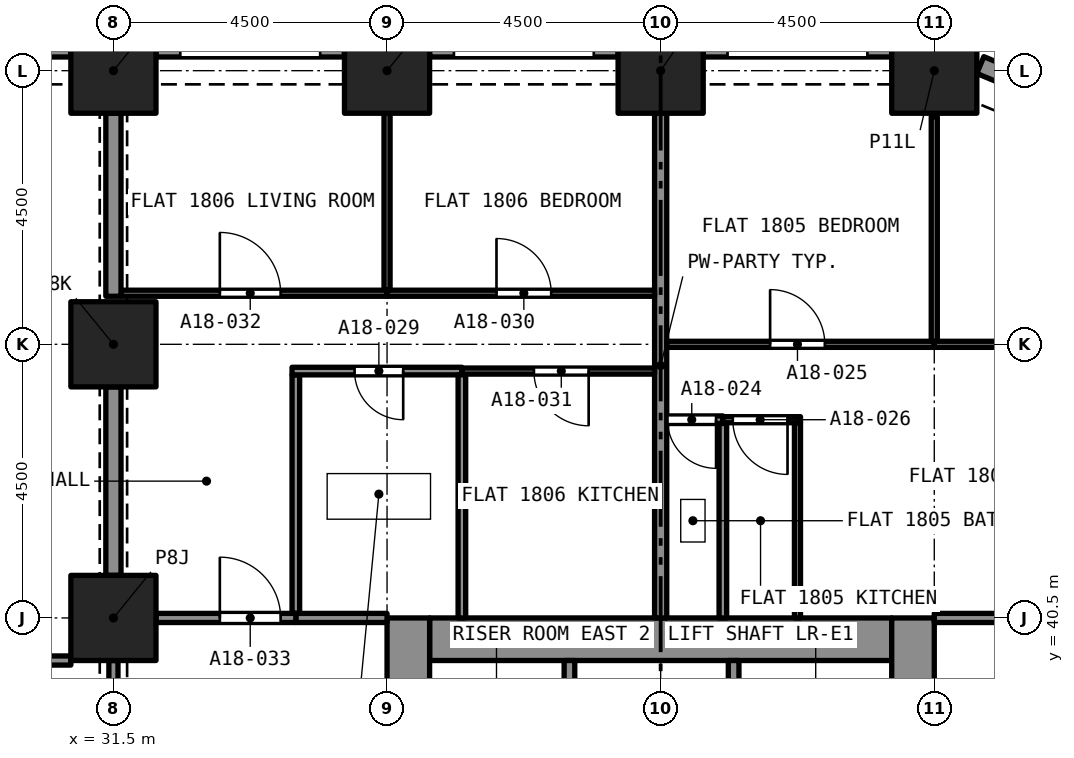
"""IFC4 building model, lengths in metres.
Left out: names, types, materials, properties, quantities, classifications, styles, units other than length and angle.
Written with IfcOpenShell. Run it as: python <this file> out.ifc"""

import sys

from ifc_helpers import new_model, si_unit, direction, frame, frame_2d, origin, origin_2d, place, context, subcontext, project, spatial, rectangle, extrude, element, fill, save


model = new_model("IFC4")
c1 = context("Model", 3, precision=1e-05, world=origin(), true_north=direction((0.0, 1.0)))
c2 = subcontext(c1, "Body", "Model", "MODEL_VIEW")
j1 = project(units=[si_unit("LENGTHUNIT", "METRE"), si_unit("PLANEANGLEUNIT", "RADIAN")], contexts=[c1])
p1 = place(None, origin())
s1 = spatial("IfcSite", under=j1, at=p1, CompositionType="ELEMENT")
p2 = place(p1, origin())
s2 = spatial("IfcBuilding", under=s1, at=p2, CompositionType="ELEMENT")
p3 = place(p2, frame((0.0, 0.0, 68.8)))
s3 = spatial("IfcBuildingStorey", under=s2, at=p3, CompositionType="ELEMENT", Elevation=68.8)
for number, where, z_axis, x_axis in (
    (1, (31.5, 40.5, 0.0), (0.0, 0.0, 1.0), (1.0, 0.0, 0.0)),
    (2, (31.5, 45.0, 0.0), (0.0, 0.0, 1.0), (1.0, 0.0, 0.0)),
    (3, (31.5, 49.5, 0.0), (0.0, 0.0, 1.0), (1.0, 0.0, 0.0)),
    (4, (36.0, 49.5, 0.0), (0.0, 0.0, 1.0), (1.0, 0.0, 0.0)),
    (5, (40.5, 49.5, 0.0), (0.0, 0.0, 1.0), (1.0, 0.0, 0.0)),
    (6, (45.0, 49.5, 0.0), (0.0, 0.0, 1.0), (1.0, 0.0, 0.0)),
):
    element("IfcColumn", number, at=place(p3, frame(where, z_axis=z_axis, x_axis=x_axis)), inside=s3, PredefinedType="COLUMN", context=c2, shape_type="SweptSolid", body=[
        extrude(rectangle(XDim=1.4, YDim=1.4, at=origin_2d()), origin(), (0.0, 0.0, 1.0), 3.2),
    ])
p4 = place(p3, frame((36.7, 40.15, 0.0), z_axis=(0.0, 0.0, 1.0), x_axis=(1.0, 0.0, 0.0)))
e7 = element("IfcWall", 7, at=p4, inside=s3, PredefinedType="SOLIDWALL", context=c2, shape_type="SweptSolid", body=[
    extrude(rectangle(XDim=7.6, YDim=0.7, at=frame_2d((3.8, 0.0))), origin(), (0.0, 0.0, 1.0), 3.2),
])
p5 = place(p3, frame((36.35, 27.0, 0.0), z_axis=(0.0, 0.0, 1.0), x_axis=(0.0, 1.0, 0.0)))
e8 = element("IfcWall", 8, at=p5, inside=s3, PredefinedType="SOLIDWALL", context=c2, shape_type="SweptSolid", body=[
    extrude(rectangle(XDim=13.5, YDim=0.7, at=frame_2d((6.75, 0.0))), origin(), (0.0, 0.0, 1.0), 3.2),
])
p6 = place(p5, frame((8.95, 0.0, 0.0)))
e9 = element("IfcOpeningElement", 9, at=p6, cuts=e8, PredefinedType="OPENING", context=c2, shape_type="SweptSolid", body=[
    extrude(rectangle(XDim=1.2, YDim=2.1, at=frame_2d((0.6, 1.05))), frame((0.0, 0.36, 0.0), z_axis=(0.0, -1.0, 0.0), x_axis=(1.0, 0.0, 0.0)), (0.0, 0.0, 1.0), 0.72),
])
p7 = place(p3, frame((44.65, 27.0, 0.0), z_axis=(0.0, 0.0, 1.0), x_axis=(0.0, 1.0, 0.0)))
e10 = element("IfcWall", 10, at=p7, inside=s3, PredefinedType="SOLIDWALL", context=c2, shape_type="SweptSolid", body=[
    extrude(rectangle(XDim=13.5, YDim=0.7, at=frame_2d((6.75, 0.0))), origin(), (0.0, 0.0, 1.0), 3.2),
])
p8 = place(p7, frame((8.95, 0.0, 0.0)))
e11 = element("IfcOpeningElement", 11, at=p8, cuts=e10, PredefinedType="OPENING", context=c2, shape_type="SweptSolid", body=[
    extrude(rectangle(XDim=1.2, YDim=2.1, at=frame_2d((0.6, 1.05))), frame((0.0, 0.36, 0.0), z_axis=(0.0, -1.0, 0.0), x_axis=(1.0, 0.0, 0.0)), (0.0, 0.0, 1.0), 0.72),
])
p9 = place(p3, frame((45.757, 49.592, 0.0), z_axis=(0.0, 0.0, 1.0), x_axis=(0.923857286003, -0.382737135771, 0.0)))
e12 = element("IfcWall", 12, at=p9, inside=s3, PredefinedType="SOLIDWALL", context=c2, shape_type="SweptSolid", body=[
    extrude(rectangle(XDim=1.865, YDim=0.3, at=frame_2d((0.933, 0.0))), origin(), (0.0, 0.0, 1.0), 3.2),
])
p10 = place(p9, frame((0.508, 0.0, 0.45)))
e13 = element("IfcOpeningElement", 13, at=p10, cuts=e12, PredefinedType="OPENING", context=c2, shape_type="SweptSolid", body=[
    extrude(rectangle(XDim=1.1, YDim=1.95, at=frame_2d((0.55, 0.975))), frame((0.0, 0.16, 0.0), z_axis=(0.0, -1.0, 0.0), x_axis=(1.0, 0.0, 0.0)), (0.0, 0.0, 1.0), 0.32),
])
p11 = place(p3, frame((41.2, 49.875, 0.0), z_axis=(0.0, 0.0, 1.0), x_axis=(1.0, 0.0, 0.0)))
e14 = element("IfcWall", 14, at=p11, inside=s3, PredefinedType="SOLIDWALL", context=c2, shape_type="SweptSolid", body=[
    extrude(rectangle(XDim=3.1, YDim=0.3, at=frame_2d((1.55, 0.0))), origin(), (0.0, 0.0, 1.0), 3.2),
])
p12 = place(p11, frame((0.4, 0.0, 0.45)))
e15 = element("IfcOpeningElement", 15, at=p12, cuts=e14, PredefinedType="OPENING", context=c2, shape_type="SweptSolid", body=[
    extrude(rectangle(XDim=2.3, YDim=1.95, at=frame_2d((1.15, 0.975))), frame((0.0, 0.16, 0.0), z_axis=(0.0, -1.0, 0.0), x_axis=(1.0, 0.0, 0.0)), (0.0, 0.0, 1.0), 0.32),
])
p13 = place(p3, frame((36.7, 49.875, 0.0), z_axis=(0.0, 0.0, 1.0), x_axis=(1.0, 0.0, 0.0)))
e16 = element("IfcWall", 16, at=p13, inside=s3, PredefinedType="SOLIDWALL", context=c2, shape_type="SweptSolid", body=[
    extrude(rectangle(XDim=3.1, YDim=0.3, at=frame_2d((1.55, 0.0))), origin(), (0.0, 0.0, 1.0), 3.2),
])
p14 = place(p13, frame((0.4, 0.0, 0.45)))
e17 = element("IfcOpeningElement", 17, at=p14, cuts=e16, PredefinedType="OPENING", context=c2, shape_type="SweptSolid", body=[
    extrude(rectangle(XDim=2.3, YDim=1.95, at=frame_2d((1.15, 0.975))), frame((0.0, 0.16, 0.0), z_axis=(0.0, -1.0, 0.0), x_axis=(1.0, 0.0, 0.0)), (0.0, 0.0, 1.0), 0.32),
])
p15 = place(p3, frame((32.2, 49.875, 0.0), z_axis=(0.0, 0.0, 1.0), x_axis=(1.0, 0.0, 0.0)))
e18 = element("IfcWall", 18, at=p15, inside=s3, PredefinedType="SOLIDWALL", context=c2, shape_type="SweptSolid", body=[
    extrude(rectangle(XDim=3.1, YDim=0.3, at=frame_2d((1.55, 0.0))), origin(), (0.0, 0.0, 1.0), 3.2),
])
p16 = place(p15, frame((0.4, 0.0, 0.45)))
e19 = element("IfcOpeningElement", 19, at=p16, cuts=e18, PredefinedType="OPENING", context=c2, shape_type="SweptSolid", body=[
    extrude(rectangle(XDim=2.3, YDim=1.95, at=frame_2d((1.15, 0.975))), frame((0.0, 0.16, 0.0), z_axis=(0.0, -1.0, 0.0), x_axis=(1.0, 0.0, 0.0)), (0.0, 0.0, 1.0), 0.32),
])
p17 = place(p3, frame((27.7, 49.875, 0.0), z_axis=(0.0, 0.0, 1.0), x_axis=(1.0, 0.0, 0.0)))
e20 = element("IfcWall", 20, at=p17, inside=s3, PredefinedType="SOLIDWALL", context=c2, shape_type="SweptSolid", body=[
    extrude(rectangle(XDim=3.1, YDim=0.3, at=frame_2d((1.55, 0.0))), origin(), (0.0, 0.0, 1.0), 3.2),
])
p18 = place(p17, frame((0.4, 0.0, 0.45)))
e21 = element("IfcOpeningElement", 21, at=p18, cuts=e20, PredefinedType="OPENING", context=c2, shape_type="SweptSolid", body=[
    extrude(rectangle(XDim=2.3, YDim=1.95, at=frame_2d((1.15, 0.975))), frame((0.0, 0.16, 0.0), z_axis=(0.0, -1.0, 0.0), x_axis=(1.0, 0.0, 0.0)), (0.0, 0.0, 1.0), 0.32),
])
p19 = place(p3, frame((41.523, 43.76, 0.0), z_axis=(0.0, 0.0, 1.0), x_axis=(-1.0, 0.0, 0.0)))
e22 = element("IfcWall", 22, at=p19, inside=s3, PredefinedType="PARTITIONING", context=c2, shape_type="SweptSolid", body=[
    extrude(rectangle(XDim=0.923, YDim=0.125, at=frame_2d((0.461, 0.0))), origin(), (0.0, 0.0, 1.0), 2.9),
])
p20 = place(p19, frame((0.111, 0.0, 0.0)))
e23 = element("IfcOpeningElement", 23, at=p20, cuts=e22, PredefinedType="OPENING", context=c2, shape_type="SweptSolid", body=[
    extrude(rectangle(XDim=0.8, YDim=2.1, at=frame_2d((0.4, 1.05))), frame((0.0, 0.073, 0.0), z_axis=(0.0, -1.0, 0.0), x_axis=(1.0, 0.0, 0.0)), (0.0, 0.0, 1.0), 0.145),
])
p21 = place(p3, frame((41.523, 40.5, 0.0), z_axis=(0.0, 0.0, 1.0), x_axis=(0.0, 1.0, 0.0)))
e24 = element("IfcWall", 24, at=p21, inside=s3, PredefinedType="PARTITIONING", context=c2, shape_type="SweptSolid", body=[
    extrude(rectangle(XDim=3.198, YDim=0.125, at=frame_2d((1.599, 0.0))), origin(), (0.0, 0.0, 1.0), 2.9),
])
p22 = place(p3, frame((40.5, 40.5, 0.0), z_axis=(0.0, 0.0, 1.0), x_axis=(0.0, 1.0, 0.0)))
e25 = element("IfcWall", 25, at=p22, inside=s3, PredefinedType="PARTITIONING", context=c2, shape_type="SweptSolid", body=[
    extrude(rectangle(XDim=8.3, YDim=0.2, at=frame_2d((4.15, 0.0))), origin(), (0.0, 0.0, 1.0), 2.9),
])
p23 = place(p3, frame((40.6, 45.0, 0.0), z_axis=(0.0, 0.0, 1.0), x_axis=(1.0, 0.0, 0.0)))
e26 = element("IfcWall", 26, at=p23, inside=s3, PredefinedType="PARTITIONING", context=c2, shape_type="SweptSolid", body=[
    extrude(rectangle(XDim=4.4, YDim=0.1, at=frame_2d((2.2, 0.0))), origin(), (0.0, 0.0, 1.0), 2.9),
])
p24 = place(p23, frame((1.7, 0.0, 0.0)))
e27 = element("IfcOpeningElement", 27, at=p24, cuts=e26, PredefinedType="OPENING", context=c2, shape_type="SweptSolid", body=[
    extrude(rectangle(XDim=0.9, YDim=2.1, at=frame_2d((0.45, 1.05))), frame((0.0, 0.06, 0.0), z_axis=(0.0, -1.0, 0.0), x_axis=(1.0, 0.0, 0.0)), (0.0, 0.0, 1.0), 0.12),
])
p25 = place(p3, frame((45.0, 45.05, 0.0), z_axis=(0.0, 0.0, 1.0), x_axis=(0.0, 1.0, 0.0)))
e28 = element("IfcWall", 28, at=p25, inside=s3, PredefinedType="PARTITIONING", context=c2, shape_type="SweptSolid", body=[
    extrude(rectangle(XDim=3.692, YDim=0.1, at=frame_2d((1.846, 0.0))), origin(), (0.0, 0.0, 1.0), 2.9),
])
p26 = place(p3, frame((42.75, 40.5, 0.0), z_axis=(0.0, 0.0, 1.0), x_axis=(0.0, 1.0, 0.0)))
e29 = element("IfcWall", 29, at=p26, inside=s3, PredefinedType="PARTITIONING", context=c2, shape_type="SweptSolid", body=[
    extrude(rectangle(XDim=3.21, YDim=0.1, at=frame_2d((1.605, 0.0))), origin(), (0.0, 0.0, 1.0), 2.9),
])
p27 = place(p3, frame((42.8, 43.76, 0.0), z_axis=(0.0, 0.0, 1.0), x_axis=(-1.0, 0.0, 0.0)))
e30 = element("IfcWall", 30, at=p27, inside=s3, PredefinedType="PARTITIONING", context=c2, shape_type="SweptSolid", body=[
    extrude(rectangle(XDim=1.277, YDim=0.1, at=frame_2d((0.639, 0.0))), origin(), (0.0, 0.0, 1.0), 2.9),
])
p28 = place(p27, frame((0.214, 0.0, 0.0)))
e31 = element("IfcOpeningElement", 31, at=p28, cuts=e30, PredefinedType="OPENING", context=c2, shape_type="SweptSolid", body=[
    extrude(rectangle(XDim=0.9, YDim=2.1, at=frame_2d((0.45, 1.05))), frame((0.0, 0.06, 0.0), z_axis=(0.0, -1.0, 0.0), x_axis=(1.0, 0.0, 0.0)), (0.0, 0.0, 1.0), 0.12),
])
p29 = place(p3, frame((45.0, 45.0, 0.0), z_axis=(0.0, 0.0, 1.0), x_axis=(1.0, 0.0, 0.0)))
e32 = element("IfcWall", 32, at=p29, inside=s3, PredefinedType="PARTITIONING", context=c2, shape_type="SweptSolid", body=[
    extrude(rectangle(XDim=3.742, YDim=0.1, at=frame_2d((1.871, 0.0))), origin(), (0.0, 0.0, 1.0), 2.9),
])
p30 = place(p29, frame((1.4, 0.0, 0.0)))
e33 = element("IfcOpeningElement", 33, at=p30, cuts=e32, PredefinedType="OPENING", context=c2, shape_type="SweptSolid", body=[
    extrude(rectangle(XDim=1.0, YDim=2.1, at=frame_2d((0.5, 1.05))), frame((0.0, 0.06, 0.0), z_axis=(0.0, -1.0, 0.0), x_axis=(1.0, 0.0, 0.0)), (0.0, 0.0, 1.0), 0.12),
])
p31 = place(p3, frame((45.0, 40.5, 0.0), z_axis=(0.0, 0.0, 1.0), x_axis=(1.0, 0.0, 0.0)))
e34 = element("IfcWall", 34, at=p31, inside=s3, PredefinedType="PARTITIONING", context=c2, shape_type="SweptSolid", body=[
    extrude(rectangle(XDim=3.8, YDim=0.15, at=frame_2d((1.9, 0.0))), origin(), (0.0, 0.0, 1.0), 2.9),
])
p32 = place(p31, frame((1.75, 0.0, 0.0)))
e35 = element("IfcOpeningElement", 35, at=p32, cuts=e34, PredefinedType="OPENING", context=c2, shape_type="SweptSolid", body=[
    extrude(rectangle(XDim=1.0, YDim=2.1, at=frame_2d((0.5, 1.05))), frame((0.0, 0.085, 0.0), z_axis=(0.0, -1.0, 0.0), x_axis=(1.0, 0.0, 0.0)), (0.0, 0.0, 1.0), 0.17),
])
p33 = place(p3, frame((34.5, 40.575, 0.0), z_axis=(0.0, 0.0, 1.0), x_axis=(0.0, 1.0, 0.0)))
e36 = element("IfcWall", 36, at=p33, inside=s3, PredefinedType="PARTITIONING", context=c2, shape_type="SweptSolid", body=[
    extrude(rectangle(XDim=3.923, YDim=0.125, at=frame_2d((1.961, 0.0))), origin(), (0.0, 0.0, 1.0), 2.9),
])
p34 = place(p3, frame((37.231, 44.56, 0.0), z_axis=(0.0, 0.0, 1.0), x_axis=(-1.0, 0.0, 0.0)))
e37 = element("IfcWall", 37, at=p34, inside=s3, PredefinedType="PARTITIONING", context=c2, shape_type="SweptSolid", body=[
    extrude(rectangle(XDim=2.794, YDim=0.125, at=frame_2d((1.397, 0.0))), origin(), (0.0, 0.0, 1.0), 2.9),
])
p35 = place(p34, frame((0.966, 0.0, 0.0)))
e38 = element("IfcOpeningElement", 38, at=p35, cuts=e37, PredefinedType="OPENING", context=c2, shape_type="SweptSolid", body=[
    extrude(rectangle(XDim=0.8, YDim=2.1, at=frame_2d((0.4, 1.05))), frame((0.0, 0.073, 0.0), z_axis=(0.0, -1.0, 0.0), x_axis=(1.0, 0.0, 0.0)), (0.0, 0.0, 1.0), 0.145),
])
p36 = place(p3, frame((37.231, 40.5, 0.0), z_axis=(0.0, 0.0, 1.0), x_axis=(0.0, 1.0, 0.0)))
e39 = element("IfcWall", 39, at=p36, inside=s3, PredefinedType="PARTITIONING", context=c2, shape_type="SweptSolid", body=[
    extrude(rectangle(XDim=3.998, YDim=0.125, at=frame_2d((1.999, 0.0))), origin(), (0.0, 0.0, 1.0), 2.9),
])
p37 = place(p3, frame((34.5, 40.5, 0.0), z_axis=(0.0, 0.0, 1.0), x_axis=(1.0, 0.0, 0.0)))
e40 = element("IfcWall", 40, at=p37, inside=s3, PredefinedType="PARTITIONING", context=c2, shape_type="SweptSolid", body=[
    extrude(rectangle(XDim=1.5, YDim=0.15, at=frame_2d((0.75, 0.0))), origin(), (0.0, 0.0, 1.0), 2.9),
])
p38 = place(p3, frame((36.0, 45.84, 0.0), z_axis=(0.0, 0.0, 1.0), x_axis=(1.0, 0.0, 0.0)))
e41 = element("IfcWall", 41, at=p38, inside=s3, PredefinedType="PARTITIONING", context=c2, shape_type="SweptSolid", body=[
    extrude(rectangle(XDim=4.4, YDim=0.1, at=frame_2d((2.2, 0.0))), origin(), (0.0, 0.0, 1.0), 2.9),
])
p39 = place(p38, frame((1.8, 0.0, 0.0)))
e42 = element("IfcOpeningElement", 42, at=p39, cuts=e41, PredefinedType="OPENING", context=c2, shape_type="SweptSolid", body=[
    extrude(rectangle(XDim=0.9, YDim=2.1, at=frame_2d((0.45, 1.05))), frame((0.0, 0.06, 0.0), z_axis=(0.0, -1.0, 0.0), x_axis=(1.0, 0.0, 0.0)), (0.0, 0.0, 1.0), 0.12),
])
p40 = place(p3, frame((36.0, 45.89, 0.0), z_axis=(0.0, 0.0, 1.0), x_axis=(0.0, 1.0, 0.0)))
e43 = element("IfcWall", 43, at=p40, inside=s3, PredefinedType="PARTITIONING", context=c2, shape_type="SweptSolid", body=[
    extrude(rectangle(XDim=2.91, YDim=0.1, at=frame_2d((1.455, 0.0))), origin(), (0.0, 0.0, 1.0), 2.9),
])
p41 = place(p3, frame((40.4, 44.56, 0.0), z_axis=(0.0, 0.0, 1.0), x_axis=(-1.0, 0.0, 0.0)))
e44 = element("IfcWall", 44, at=p41, inside=s3, PredefinedType="PARTITIONING", context=c2, shape_type="SweptSolid", body=[
    extrude(rectangle(XDim=3.168, YDim=0.1, at=frame_2d((1.584, 0.0))), origin(), (0.0, 0.0, 1.0), 2.9),
])
p42 = place(p41, frame((1.084, 0.0, 0.0)))
e45 = element("IfcOpeningElement", 45, at=p42, cuts=e44, PredefinedType="OPENING", context=c2, shape_type="SweptSolid", body=[
    extrude(rectangle(XDim=0.9, YDim=2.1, at=frame_2d((0.45, 1.05))), frame((0.0, 0.06, 0.0), z_axis=(0.0, -1.0, 0.0), x_axis=(1.0, 0.0, 0.0)), (0.0, 0.0, 1.0), 0.12),
])
p43 = place(p3, frame((31.625, 45.84, 0.0), z_axis=(0.0, 0.0, 1.0), x_axis=(1.0, 0.0, 0.0)))
e46 = element("IfcWall", 46, at=p43, inside=s3, PredefinedType="PARTITIONING", context=c2, shape_type="SweptSolid", body=[
    extrude(rectangle(XDim=4.375, YDim=0.1, at=frame_2d((2.188, 0.0))), origin(), (0.0, 0.0, 1.0), 2.9),
])
p44 = place(p43, frame((1.625, 0.0, 0.0)))
e47 = element("IfcOpeningElement", 47, at=p44, cuts=e46, PredefinedType="OPENING", context=c2, shape_type="SweptSolid", body=[
    extrude(rectangle(XDim=1.0, YDim=2.1, at=frame_2d((0.5, 1.05))), frame((0.0, 0.06, 0.0), z_axis=(0.0, -1.0, 0.0), x_axis=(1.0, 0.0, 0.0)), (0.0, 0.0, 1.0), 0.12),
])
p45 = place(p3, frame((31.5, 41.2, 0.0), z_axis=(0.0, 0.0, 1.0), x_axis=(0.0, 1.0, 0.0)))
e48 = element("IfcWall", 48, at=p45, inside=s3, PredefinedType="PARTITIONING", context=c2, shape_type="SweptSolid", body=[
    extrude(rectangle(XDim=3.1, YDim=0.25, at=frame_2d((1.55, 0.0))), origin(), (0.0, 0.0, 1.0), 2.38),
])
p46 = place(p3, frame((32.2, 40.5, 0.0), z_axis=(0.0, 0.0, 1.0), x_axis=(1.0, 0.0, 0.0)))
e49 = element("IfcWall", 49, at=p46, inside=s3, PredefinedType="PARTITIONING", context=c2, shape_type="SweptSolid", body=[
    extrude(rectangle(XDim=2.3, YDim=0.15, at=frame_2d((1.15, 0.0))), origin(), (0.0, 0.0, 1.0), 2.9),
])
p47 = place(p46, frame((1.05, 0.0, 0.0)))
e50 = element("IfcOpeningElement", 50, at=p47, cuts=e49, PredefinedType="OPENING", context=c2, shape_type="SweptSolid", body=[
    extrude(rectangle(XDim=1.0, YDim=2.1, at=frame_2d((0.5, 1.05))), frame((0.0, 0.085, 0.0), z_axis=(0.0, -1.0, 0.0), x_axis=(1.0, 0.0, 0.0)), (0.0, 0.0, 1.0), 0.17),
])
p48 = place(p3, frame((31.5, 45.79, 0.0), z_axis=(0.0, 0.0, 1.0), x_axis=(0.0, 1.0, 0.0)))
e51 = element("IfcWall", 51, at=p48, inside=s3, PredefinedType="PARTITIONING", context=c2, shape_type="SweptSolid", body=[
    extrude(rectangle(XDim=3.01, YDim=0.25, at=frame_2d((1.505, 0.0))), origin(), (0.0, 0.0, 1.0), 2.38),
])
p49 = place(p3, frame((18.7, 39.8, 0.0), z_axis=(0.0, 0.0, 1.0), x_axis=(1.0, 0.0, 0.0)))
e52 = element("IfcWall", 52, at=p49, inside=s3, PredefinedType="PARTITIONING", context=c2, shape_type="SweptSolid", body=[
    extrude(rectangle(XDim=12.1, YDim=0.15, at=frame_2d((6.05, 0.0))), origin(), (0.0, 0.0, 1.0), 2.75),
])
p50 = place(p49, frame((5.55, 0.0, 0.0)))
e53 = element("IfcOpeningElement", 53, at=p50, cuts=e52, PredefinedType="OPENING", context=c2, shape_type="SweptSolid", body=[
    extrude(rectangle(XDim=1.0, YDim=2.1, at=frame_2d((0.5, 1.05))), frame((0.0, 0.085, 0.0), z_axis=(0.0, -1.0, 0.0), x_axis=(1.0, 0.0, 0.0)), (0.0, 0.0, 1.0), 0.17),
])
p51 = place(p3, frame((31.5, 36.7, 0.0), z_axis=(0.0, 0.0, 1.0), x_axis=(0.0, 1.0, 0.0)))
e54 = element("IfcWall", 54, at=p51, inside=s3, PredefinedType="PARTITIONING", context=c2, shape_type="SweptSolid", body=[
    extrude(rectangle(XDim=3.1, YDim=0.15, at=frame_2d((1.55, 0.0))), origin(), (0.0, 0.0, 1.0), 2.38),
])
p52 = place(p51, frame((0.95, 0.0, 0.0)))
e55 = element("IfcOpeningElement", 55, at=p52, cuts=e54, PredefinedType="OPENING", context=c2, shape_type="SweptSolid", body=[
    extrude(rectangle(XDim=1.2, YDim=2.1, at=frame_2d((0.6, 1.05))), frame((0.0, 0.085, 0.0), z_axis=(0.0, -1.0, 0.0), x_axis=(1.0, 0.0, 0.0)), (0.0, 0.0, 1.0), 0.17),
])
for number, where, z_axis, x_axis in (
    (56, (41.7, 37.5, 0.0), (0.0, 0.0, 1.0), (0.0, 1.0, 0.0)),
    (57, (39.0, 37.5, 0.0), (0.0, 0.0, 1.0), (0.0, 1.0, 0.0)),
):
    element("IfcWall", number, at=place(p3, frame(where, z_axis=z_axis, x_axis=x_axis)), inside=s3, PredefinedType="SOLIDWALL", context=c2, shape_type="SweptSolid", body=[
        extrude(rectangle(XDim=2.3, YDim=0.175, at=frame_2d((1.15, 0.0))), origin(), (0.0, 0.0, 1.0), 2.9),
    ])
p53 = place(p20, origin())
e58 = element("IfcDoor", 58, at=p53, inside=s3, OperationType="SINGLE_SWING_RIGHT", PredefinedType="DOOR", context=c2, shape_type="SweptSolid", body=[
    extrude(rectangle(XDim=0.8, YDim=2.1, at=frame_2d((0.4, 1.05))), frame((0.0, 0.025, 0.0), z_axis=(0.0, -1.0, 0.0), x_axis=(1.0, 0.0, 0.0)), (0.0, 0.0, 1.0), 0.05),
])
fill(e23, e58)
p54 = place(p24, origin())
e59 = element("IfcDoor", 59, at=p54, inside=s3, OperationType="SINGLE_SWING_LEFT", PredefinedType="DOOR", context=c2, shape_type="SweptSolid", body=[
    extrude(rectangle(XDim=0.9, YDim=2.1, at=frame_2d((0.45, 1.05))), frame((0.0, 0.025, 0.0), z_axis=(0.0, -1.0, 0.0), x_axis=(1.0, 0.0, 0.0)), (0.0, 0.0, 1.0), 0.05),
])
fill(e27, e59)
p55 = place(p28, origin())
e60 = element("IfcDoor", 60, at=p55, inside=s3, OperationType="SINGLE_SWING_RIGHT", PredefinedType="DOOR", context=c2, shape_type="SweptSolid", body=[
    extrude(rectangle(XDim=0.9, YDim=2.1, at=frame_2d((0.45, 1.05))), frame((0.0, 0.025, 0.0), z_axis=(0.0, -1.0, 0.0), x_axis=(1.0, 0.0, 0.0)), (0.0, 0.0, 1.0), 0.05),
])
fill(e31, e60)
p56 = place(p35, origin())
e61 = element("IfcDoor", 61, at=p56, inside=s3, OperationType="SINGLE_SWING_LEFT", PredefinedType="DOOR", context=c2, shape_type="SweptSolid", body=[
    extrude(rectangle(XDim=0.8, YDim=2.1, at=frame_2d((0.4, 1.05))), frame((0.0, 0.025, 0.0), z_axis=(0.0, -1.0, 0.0), x_axis=(1.0, 0.0, 0.0)), (0.0, 0.0, 1.0), 0.05),
])
fill(e38, e61)
p57 = place(p39, origin())
e62 = element("IfcDoor", 62, at=p57, inside=s3, OperationType="SINGLE_SWING_RIGHT", PredefinedType="DOOR", context=c2, shape_type="SweptSolid", body=[
    extrude(rectangle(XDim=0.9, YDim=2.1, at=frame_2d((0.45, 1.05))), frame((0.0, 0.025, 0.0), z_axis=(0.0, -1.0, 0.0), x_axis=(1.0, 0.0, 0.0)), (0.0, 0.0, 1.0), 0.05),
])
fill(e42, e62)
p58 = place(p42, origin())
e63 = element("IfcDoor", 63, at=p58, inside=s3, OperationType="SINGLE_SWING_LEFT", PredefinedType="DOOR", context=c2, shape_type="SweptSolid", body=[
    extrude(rectangle(XDim=0.9, YDim=2.1, at=frame_2d((0.45, 1.05))), frame((0.0, 0.025, 0.0), z_axis=(0.0, -1.0, 0.0), x_axis=(1.0, 0.0, 0.0)), (0.0, 0.0, 1.0), 0.05),
])
fill(e45, e63)
p59 = place(p44, origin())
e64 = element("IfcDoor", 64, at=p59, inside=s3, OperationType="SINGLE_SWING_LEFT", PredefinedType="DOOR", context=c2, shape_type="SweptSolid", body=[
    extrude(rectangle(XDim=1.0, YDim=2.1, at=frame_2d((0.5, 1.05))), frame((0.0, 0.025, 0.0), z_axis=(0.0, -1.0, 0.0), x_axis=(1.0, 0.0, 0.0)), (0.0, 0.0, 1.0), 0.05),
])
fill(e47, e64)
p60 = place(p47, origin())
e65 = element("IfcDoor", 65, at=p60, inside=s3, OperationType="SINGLE_SWING_RIGHT", PredefinedType="DOOR", context=c2, shape_type="SweptSolid", body=[
    extrude(rectangle(XDim=1.0, YDim=2.1, at=frame_2d((0.5, 1.05))), frame((0.0, 0.025, 0.0), z_axis=(0.0, -1.0, 0.0), x_axis=(1.0, 0.0, 0.0)), (0.0, 0.0, 1.0), 0.05),
])
fill(e50, e65)
save(model, sys.argv[1])
